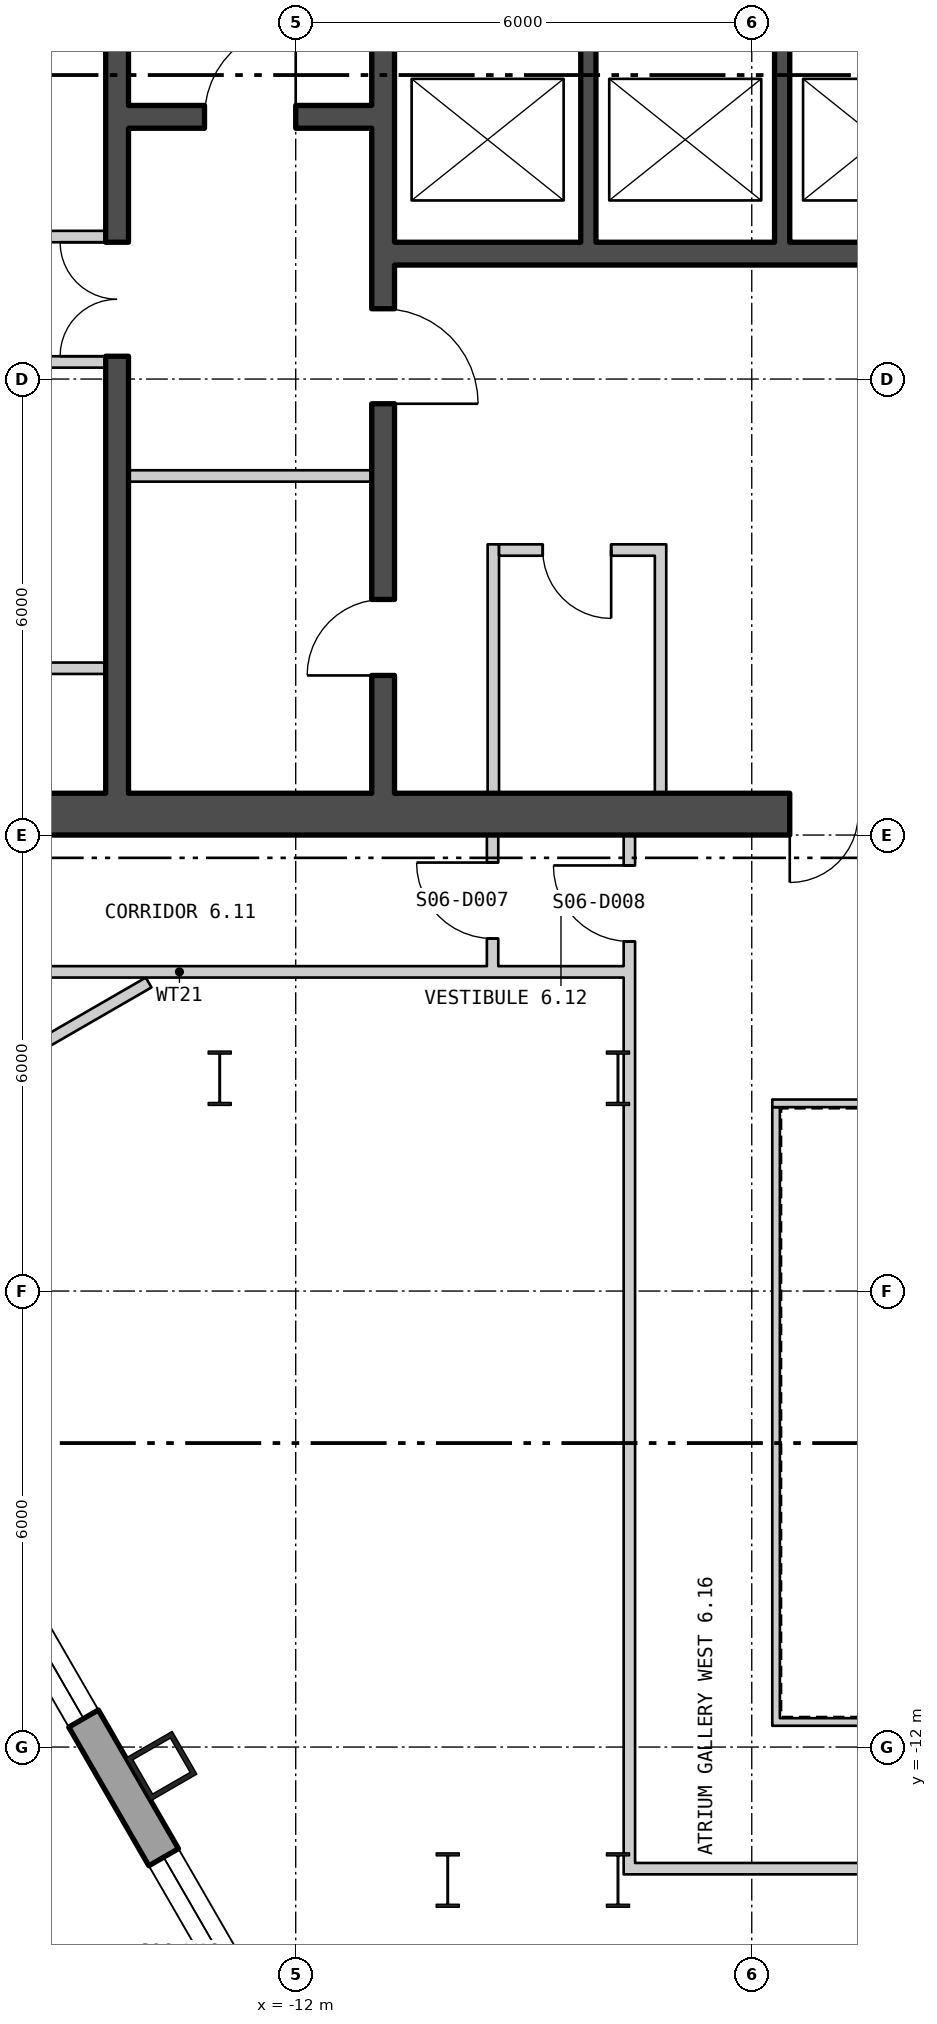
"""IFC4 building model, lengths in metres.
Left out: names, types, materials, properties, quantities, classifications, styles, units other than length and angle.
Written with IfcOpenShell. Run it as: python <this file> out.ifc"""

import sys

from ifc_helpers import new_model, si_unit, direction, frame, frame_2d, origin, origin_2d, place, context, subcontext, project, spatial, polyline, rectangle, hollow_rectangle, i_section, outline, extrude, element, fill, save


model = new_model("IFC4")
c1 = context("Model", 3, precision=1e-05, world=origin(), true_north=direction((0.0, 1.0)))
c2 = subcontext(c1, "Body", "Model", "MODEL_VIEW")
j1 = project(units=[si_unit("LENGTHUNIT", "METRE"), si_unit("PLANEANGLEUNIT", "RADIAN")], contexts=[c1])
p1 = place(None, origin())
s1 = spatial("IfcSite", under=j1, at=p1, CompositionType="ELEMENT")
p2 = place(p1, origin())
s2 = spatial("IfcBuilding", under=s1, at=p2, CompositionType="ELEMENT")
p3 = place(p2, frame((0.0, 0.0, 84.3)))
s3 = spatial("IfcBuildingStorey", under=s2, at=p3, CompositionType="ELEMENT", Elevation=84.3)
p4 = place(p3, frame((-13.766, -12.25, 0.0), z_axis=(0.0, 0.0, 1.0), x_axis=(0.5, -0.866025403784, 0.0)))
e1 = element("IfcColumn", 1, at=p4, inside=s3, PredefinedType="COLUMN", context=c2, shape_type="SweptSolid", body=[
    extrude(hollow_rectangle(XDim=0.65, YDim=0.7, WallThickness=0.065, at=origin_2d()), origin(), (0.0, 0.0, 1.0), 4.5),
])
for number, where, z_axis, x_axis in (
    (2, (-7.76, -3.2, 0.0), (0.0, 0.0, 1.0), (1.0, 0.0, 0.0)),
    (3, (-7.76, -13.75, 0.0), (0.0, 0.0, 1.0), (1.0, 0.0, 0.0)),
    (4, (-13.0, -3.2, 0.0), (0.0, 0.0, 1.0), (1.0, 0.0, 0.0)),
    (5, (-10.0, -13.75, 0.0), (0.0, 0.0, 1.0), (1.0, 0.0, 0.0)),
):
    element("IfcColumn", number, at=place(p3, frame(where, z_axis=z_axis, x_axis=x_axis)), inside=s3, PredefinedType="COLUMN", context=c2, shape_type="SweptSolid", body=[
        extrude(i_section(OverallWidth=0.304, OverallDepth=0.716, WebThickness=0.021, FlangeThickness=0.04, at=origin_2d()), origin(), (0.0, 0.0, 1.0), 4.5),
    ])
p5 = place(p3, frame((-27.95, 11.167, -0.18), z_axis=(0.0, 0.0, 1.0), x_axis=(0.499999194392, -0.866025868902, 0.0)))
e6 = element("IfcWall", 6, at=p5, inside=s3, PredefinedType="SOLIDWALL", context=c2, shape_type="SweptSolid", body=[
    extrude(outline(polyline([(-0.13, -0.225), (45.86, -0.225), (45.6, 0.225), (0.13, 0.225), (-0.13, -0.225)])), origin(), (0.0, 0.0, 1.0), 4.28),
])
p6 = place(p5, frame((5.892, 0.0, 1.08)))
e7 = element("IfcOpeningElement", 7, at=p6, cuts=e6, PredefinedType="OPENING", context=c2, shape_type="SweptSolid", body=[
    extrude(rectangle(XDim=2.4, YDim=2.6, at=frame_2d((1.2, 1.3))), frame((0.0, 0.235, 0.0), z_axis=(0.0, -1.0, 0.0), x_axis=(1.0, 0.0, 0.0)), (0.0, 0.0, 1.0), 0.47),
])
p7 = place(p5, frame((10.399, 0.0, 1.08)))
e8 = element("IfcOpeningElement", 8, at=p7, cuts=e6, PredefinedType="OPENING", context=c2, shape_type="SweptSolid", body=[
    extrude(rectangle(XDim=2.4, YDim=2.6, at=frame_2d((1.2, 1.3))), frame((0.0, 0.235, 0.0), z_axis=(0.0, -1.0, 0.0), x_axis=(1.0, 0.0, 0.0)), (0.0, 0.0, 1.0), 0.47),
])
p8 = place(p5, frame((14.905, 0.0, 1.08)))
e9 = element("IfcOpeningElement", 9, at=p8, cuts=e6, PredefinedType="OPENING", context=c2, shape_type="SweptSolid", body=[
    extrude(rectangle(XDim=2.4, YDim=2.6, at=frame_2d((1.2, 1.3))), frame((0.0, 0.235, 0.0), z_axis=(0.0, -1.0, 0.0), x_axis=(1.0, 0.0, 0.0)), (0.0, 0.0, 1.0), 0.47),
])
p9 = place(p5, frame((19.412, 0.0, 1.08)))
e10 = element("IfcOpeningElement", 10, at=p9, cuts=e6, PredefinedType="OPENING", context=c2, shape_type="SweptSolid", body=[
    extrude(rectangle(XDim=2.4, YDim=2.6, at=frame_2d((1.2, 1.3))), frame((0.0, 0.235, 0.0), z_axis=(0.0, -1.0, 0.0), x_axis=(1.0, 0.0, 0.0)), (0.0, 0.0, 1.0), 0.47),
])
p10 = place(p5, frame((23.918, 0.0, 1.08)))
e11 = element("IfcOpeningElement", 11, at=p10, cuts=e6, PredefinedType="OPENING", context=c2, shape_type="SweptSolid", body=[
    extrude(rectangle(XDim=2.4, YDim=2.6, at=frame_2d((1.2, 1.3))), frame((0.0, 0.235, 0.0), z_axis=(0.0, -1.0, 0.0), x_axis=(1.0, 0.0, 0.0)), (0.0, 0.0, 1.0), 0.47),
])
p11 = place(p5, frame((28.425, 0.0, 1.08)))
e12 = element("IfcOpeningElement", 12, at=p11, cuts=e6, PredefinedType="OPENING", context=c2, shape_type="SweptSolid", body=[
    extrude(rectangle(XDim=2.4, YDim=2.6, at=frame_2d((1.2, 1.3))), frame((0.0, 0.235, 0.0), z_axis=(0.0, -1.0, 0.0), x_axis=(1.0, 0.0, 0.0)), (0.0, 0.0, 1.0), 0.47),
])
p12 = place(p5, frame((32.932, 0.0, 1.08)))
e13 = element("IfcOpeningElement", 13, at=p12, cuts=e6, PredefinedType="OPENING", context=c2, shape_type="SweptSolid", body=[
    extrude(rectangle(XDim=2.4, YDim=2.6, at=frame_2d((1.2, 1.3))), frame((0.0, 0.235, 0.0), z_axis=(0.0, -1.0, 0.0), x_axis=(1.0, 0.0, 0.0)), (0.0, 0.0, 1.0), 0.47),
])
p13 = place(p5, frame((37.438, 0.0, 1.08)))
e14 = element("IfcOpeningElement", 14, at=p13, cuts=e6, PredefinedType="OPENING", context=c2, shape_type="SweptSolid", body=[
    extrude(rectangle(XDim=2.4, YDim=2.6, at=frame_2d((1.2, 1.3))), frame((0.0, 0.235, 0.0), z_axis=(0.0, -1.0, 0.0), x_axis=(1.0, 0.0, 0.0)), (0.0, 0.0, 1.0), 0.47),
])
p14 = place(p5, frame((41.907, 0.0, 1.08)))
e15 = element("IfcOpeningElement", 15, at=p14, cuts=e6, PredefinedType="OPENING", context=c2, shape_type="SweptSolid", body=[
    extrude(rectangle(XDim=2.4, YDim=2.6, at=frame_2d((1.2, 1.3))), frame((0.0, 0.235, 0.0), z_axis=(0.0, -1.0, 0.0), x_axis=(1.0, 0.0, 0.0)), (0.0, 0.0, 1.0), 0.47),
])
for number, where, z_axis, x_axis in (
    (16, (-5.73, -11.67, 0.0), (0.0, 0.0, 1.0), (1.0, 0.0, 0.0)),
    (17, (5.73, -3.53, 0.0), (0.0, 0.0, 1.0), (-1.0, 0.0, 0.0)),
):
    element("IfcWall", number, at=place(p3, frame(where, z_axis=z_axis, x_axis=x_axis)), inside=s3, PredefinedType="PARTITIONING", context=c2, shape_type="SweptSolid", body=[
        extrude(rectangle(XDim=11.46, YDim=0.1, at=frame_2d((5.73, 0.0))), origin(), (0.0, 0.0, 1.0), 4.3),
    ])
p15 = place(p3, frame((-5.68, -3.58, 0.0), z_axis=(0.0, 0.0, 1.0), x_axis=(0.0, -1.0, 0.0)))
e18 = element("IfcWall", 18, at=p15, inside=s3, PredefinedType="PARTITIONING", context=c2, shape_type="SweptSolid", body=[
    extrude(rectangle(XDim=8.04, YDim=0.1, at=frame_2d((4.02, 0.0))), origin(), (0.0, 0.0, 1.0), 4.3),
])
p16 = place(p3, frame((-17.5, 0.275, 0.0), z_axis=(0.0, 0.0, 1.0), x_axis=(1.0, 0.0, 0.0)))
e19 = element("IfcWall", 19, at=p16, inside=s3, PredefinedType="SHEAR", context=c2, shape_type="SweptSolid", body=[
    extrude(rectangle(XDim=35.0, YDim=0.55, at=frame_2d((17.5, 0.0))), origin(), (0.0, 0.0, 1.0), 4.3),
])
p17 = place(p16, frame((12.0, 0.0, 0.0)))
e20 = element("IfcOpeningElement", 20, at=p17, cuts=e19, PredefinedType="OPENING", context=c2, shape_type="SweptSolid", body=[
    extrude(rectangle(XDim=1.8, YDim=2.4, at=frame_2d((0.9, 1.2))), frame((0.0, 0.285, 0.0), z_axis=(0.0, -1.0, 0.0), x_axis=(1.0, 0.0, 0.0)), (0.0, 0.0, 1.0), 0.57),
])
p18 = place(p16, frame((22.0, 0.0, 0.0)))
e21 = element("IfcOpeningElement", 21, at=p18, cuts=e19, PredefinedType="OPENING", context=c2, shape_type="SweptSolid", body=[
    extrude(rectangle(XDim=1.8, YDim=2.4, at=frame_2d((0.9, 1.2))), frame((0.0, 0.285, 0.0), z_axis=(0.0, -1.0, 0.0), x_axis=(1.0, 0.0, 0.0)), (0.0, 0.0, 1.0), 0.57),
])
p19 = place(p3, frame((-10.85, 0.55, 0.0), z_axis=(0.0, 0.0, 1.0), x_axis=(0.0, 1.0, 0.0)))
e22 = element("IfcWall", 22, at=p19, inside=s3, PredefinedType="SHEAR", context=c2, shape_type="SweptSolid", body=[
    extrude(rectangle(XDim=16.9, YDim=0.3, at=frame_2d((8.45, 0.0))), origin(), (0.0, 0.0, 1.0), 4.3),
])
p20 = place(p19, frame((5.125, 0.0, 0.0)))
e23 = element("IfcOpeningElement", 23, at=p20, cuts=e22, PredefinedType="OPENING", context=c2, shape_type="SweptSolid", body=[
    extrude(rectangle(XDim=1.25, YDim=2.1, at=frame_2d((0.625, 1.05))), frame((0.0, 0.16, 0.0), z_axis=(0.0, -1.0, 0.0), x_axis=(1.0, 0.0, 0.0)), (0.0, 0.0, 1.0), 0.32),
])
p21 = place(p19, frame((1.55, 0.0, 0.0)))
e24 = element("IfcOpeningElement", 24, at=p21, cuts=e22, PredefinedType="OPENING", context=c2, shape_type="SweptSolid", body=[
    extrude(rectangle(XDim=1.0, YDim=2.1, at=frame_2d((0.5, 1.05))), frame((0.0, 0.16, 0.0), z_axis=(0.0, -1.0, 0.0), x_axis=(1.0, 0.0, 0.0)), (0.0, 0.0, 1.0), 0.32),
])
p22 = place(p3, frame((-14.35, 0.55, 0.0), z_axis=(0.0, 0.0, 1.0), x_axis=(0.0, 1.0, 0.0)))
e25 = element("IfcWall", 25, at=p22, inside=s3, PredefinedType="SHEAR", context=c2, shape_type="SweptSolid", body=[
    extrude(rectangle(XDim=16.9, YDim=0.3, at=frame_2d((8.45, 0.0))), origin(), (0.0, 0.0, 1.0), 4.3),
])
p23 = place(p22, frame((5.75, 0.0, 0.0)))
e26 = element("IfcOpeningElement", 26, at=p23, cuts=e25, PredefinedType="OPENING", context=c2, shape_type="SweptSolid", body=[
    extrude(rectangle(XDim=1.5, YDim=2.1, at=frame_2d((0.75, 1.05))), frame((0.0, 0.16, 0.0), z_axis=(0.0, -1.0, 0.0), x_axis=(1.0, 0.0, 0.0)), (0.0, 0.0, 1.0), 0.32),
])
p24 = place(p3, frame((-14.2, 9.45, 0.0), z_axis=(0.0, 0.0, 1.0), x_axis=(1.0, 0.0, 0.0)))
e27 = element("IfcWall", 27, at=p24, inside=s3, PredefinedType="SHEAR", context=c2, shape_type="SweptSolid", body=[
    extrude(rectangle(XDim=3.2, YDim=0.3, at=frame_2d((1.6, 0.0))), origin(), (0.0, 0.0, 1.0), 4.3),
])
p25 = place(p24, frame((1.0, 0.0, 0.0)))
e28 = element("IfcOpeningElement", 28, at=p25, cuts=e27, PredefinedType="OPENING", context=c2, shape_type="SweptSolid", body=[
    extrude(rectangle(XDim=1.2, YDim=2.1, at=frame_2d((0.6, 1.05))), frame((0.0, 0.16, 0.0), z_axis=(0.0, -1.0, 0.0), x_axis=(1.0, 0.0, 0.0)), (0.0, 0.0, 1.0), 0.32),
])
p26 = place(p3, frame((-10.7, 7.65, 0.0), z_axis=(0.0, 0.0, 1.0), x_axis=(1.0, 0.0, 0.0)))
e29 = element("IfcWall", 29, at=p26, inside=s3, PredefinedType="SHEAR", context=c2, shape_type="SweptSolid", body=[
    extrude(rectangle(XDim=10.3, YDim=0.3, at=frame_2d((5.15, 0.0))), origin(), (0.0, 0.0, 1.0), 4.3),
])
for number, where, z_axis, x_axis in (
    (30, (-8.15, 7.8, 0.0), (0.0, 0.0, 1.0), (0.0, 1.0, 0.0)),
    (31, (-5.6, 7.8, 0.0), (0.0, 0.0, 1.0), (0.0, 1.0, 0.0)),
):
    element("IfcWall", number, at=place(p3, frame(where, z_axis=z_axis, x_axis=x_axis)), inside=s3, PredefinedType="SHEAR", context=c2, shape_type="SweptSolid", body=[
        extrude(rectangle(XDim=2.7, YDim=0.2, at=frame_2d((1.35, 0.0))), origin(), (0.0, 0.0, 1.0), 4.3),
    ])
p27 = place(p3, frame((-14.2, 4.725, 0.0), z_axis=(0.0, 0.0, 1.0), x_axis=(1.0, 0.0, 0.0)))
e32 = element("IfcWall", 32, at=p27, inside=s3, PredefinedType="PARTITIONING", context=c2, shape_type="SweptSolid", body=[
    extrude(rectangle(XDim=3.2, YDim=0.15, at=frame_2d((1.6, 0.0))), origin(), (0.0, 0.0, 1.0), 4.3),
])
for number, where, z_axis, x_axis in (
    (33, (-16.95, 6.225, 0.0), (0.0, 0.0, 1.0), (1.0, 0.0, 0.0)),
    (34, (-16.95, 7.875, 0.0), (0.0, 0.0, 1.0), (1.0, 0.0, 0.0)),
    (35, (-16.95, 2.195, 0.0), (0.0, 0.0, 1.0), (1.0, 0.0, 0.0)),
):
    element("IfcWall", number, at=place(p3, frame(where, z_axis=z_axis, x_axis=x_axis)), inside=s3, PredefinedType="PARTITIONING", context=c2, shape_type="SweptSolid", body=[
        extrude(rectangle(XDim=2.45, YDim=0.15, at=frame_2d((1.225, 0.0))), origin(), (0.0, 0.0, 1.0), 4.3),
    ])
for number, where, z_axis, x_axis in (
    (36, (-9.4, 0.55, 0.0), (0.0, 0.0, 1.0), (0.0, 1.0, 0.0)),
    (37, (-7.2, 0.55, 0.0), (0.0, 0.0, 1.0), (0.0, 1.0, 0.0)),
):
    element("IfcWall", number, at=place(p3, frame(where, z_axis=z_axis, x_axis=x_axis)), inside=s3, PredefinedType="PARTITIONING", context=c2, shape_type="SweptSolid", body=[
        extrude(rectangle(XDim=3.275, YDim=0.15, at=frame_2d((1.637, 0.0))), origin(), (0.0, 0.0, 1.0), 4.3),
    ])
p28 = place(p3, frame((-9.325, 3.75, 0.0), z_axis=(0.0, 0.0, 1.0), x_axis=(1.0, 0.0, 0.0)))
e38 = element("IfcWall", 38, at=p28, inside=s3, PredefinedType="PARTITIONING", context=c2, shape_type="SweptSolid", body=[
    extrude(rectangle(XDim=2.05, YDim=0.15, at=frame_2d((1.025, 0.0))), origin(), (0.0, 0.0, 1.0), 4.3),
])
p29 = place(p28, frame((0.575, 0.0, 0.0)))
e39 = element("IfcOpeningElement", 39, at=p29, cuts=e38, PredefinedType="OPENING", context=c2, shape_type="SweptSolid", body=[
    extrude(rectangle(XDim=0.9, YDim=2.1, at=frame_2d((0.45, 1.05))), frame((0.0, 0.085, 0.0), z_axis=(0.0, -1.0, 0.0), x_axis=(1.0, 0.0, 0.0)), (0.0, 0.0, 1.0), 0.17),
])
p30 = place(p3, frame((-19.375, -1.8, 0.0), z_axis=(0.0, 0.0, 1.0), x_axis=(1.0, 0.0, 0.0)))
e40 = element("IfcWall", 40, at=p30, inside=s3, PredefinedType="PARTITIONING", context=c2, shape_type="SweptSolid", body=[
    extrude(rectangle(XDim=11.69, YDim=0.15, at=frame_2d((5.845, 0.0))), origin(), (0.0, 0.0, 1.0), 4.3),
])
p31 = place(p30, frame((2.365, 0.0, 0.0)))
e41 = element("IfcOpeningElement", 41, at=p31, cuts=e40, PredefinedType="OPENING", context=c2, shape_type="SweptSolid", body=[
    extrude(rectangle(XDim=1.0, YDim=2.1, at=frame_2d((0.5, 1.05))), frame((0.0, 0.085, 0.0), z_axis=(0.0, -1.0, 0.0), x_axis=(1.0, 0.0, 0.0)), (0.0, 0.0, 1.0), 0.17),
])
p32 = place(p3, frame((-18.186, -4.394, 0.0), z_axis=(0.0, 0.0, 1.0), x_axis=(0.866053278629, 0.499951716245, 0.0)))
e42 = element("IfcWall", 42, at=p32, inside=s3, PredefinedType="PARTITIONING", context=c2, shape_type="SweptSolid", body=[
    extrude(rectangle(XDim=4.909, YDim=0.15, at=frame_2d((2.454, 0.0))), origin(), (0.0, 0.0, 1.0), 4.3),
])
p33 = place(p3, frame((-9.41, -1.725, 0.0), z_axis=(0.0, 0.0, 1.0), x_axis=(0.0, 1.0, 0.0)))
e43 = element("IfcWall", 43, at=p33, inside=s3, PredefinedType="PARTITIONING", context=c2, shape_type="SweptSolid", body=[
    extrude(rectangle(XDim=1.725, YDim=0.15, at=frame_2d((0.863, 0.0))), origin(), (0.0, 0.0, 1.0), 4.3),
])
p34 = place(p33, frame((0.363, 0.0, 0.0)))
e44 = element("IfcOpeningElement", 44, at=p34, cuts=e43, PredefinedType="OPENING", context=c2, shape_type="SweptSolid", body=[
    extrude(rectangle(XDim=1.0, YDim=2.1, at=frame_2d((0.5, 1.05))), frame((0.0, 0.085, 0.0), z_axis=(0.0, -1.0, 0.0), x_axis=(1.0, 0.0, 0.0)), (0.0, 0.0, 1.0), 0.17),
])
p35 = place(p3, frame((-7.61, -13.675, 0.0), z_axis=(0.0, 0.0, 1.0), x_axis=(0.0, 1.0, 0.0)))
e45 = element("IfcWall", 45, at=p35, inside=s3, PredefinedType="PARTITIONING", context=c2, shape_type="SweptSolid", body=[
    extrude(rectangle(XDim=10.167, YDim=0.15, at=frame_2d((5.083, 0.0))), origin(), (0.0, 0.0, 1.0), 3.7),
])
p36 = place(p3, frame((-7.61, -3.508, 0.0), z_axis=(0.0, 0.0, 1.0), x_axis=(0.0, 1.0, 0.0)))
e46 = element("IfcWall", 46, at=p36, inside=s3, PredefinedType="PARTITIONING", context=c2, shape_type="SweptSolid", body=[
    extrude(rectangle(XDim=3.508, YDim=0.15, at=frame_2d((1.754, 0.0))), origin(), (0.0, 0.0, 1.0), 4.3),
])
p37 = place(p36, frame((2.108, 0.0, 0.0)))
e47 = element("IfcOpeningElement", 47, at=p37, cuts=e46, PredefinedType="OPENING", context=c2, shape_type="SweptSolid", body=[
    extrude(rectangle(XDim=1.0, YDim=2.1, at=frame_2d((0.5, 1.05))), frame((0.0, 0.085, 0.0), z_axis=(0.0, -1.0, 0.0), x_axis=(1.0, 0.0, 0.0)), (0.0, 0.0, 1.0), 0.17),
])
p38 = place(p3, frame((-7.535, -13.6, 0.0), z_axis=(0.0, 0.0, 1.0), x_axis=(1.0, 0.0, 0.0)))
e48 = element("IfcWall", 48, at=p38, inside=s3, PredefinedType="PARTITIONING", context=c2, shape_type="SweptSolid", body=[
    extrude(rectangle(XDim=5.835, YDim=0.15, at=frame_2d((2.917, 0.0))), origin(), (0.0, 0.0, 1.0), 3.39),
])
p39 = place(p38, frame((3.324, 0.0, 0.0)))
e49 = element("IfcOpeningElement", 49, at=p39, cuts=e48, PredefinedType="OPENING", context=c2, shape_type="SweptSolid", body=[
    extrude(rectangle(XDim=1.0, YDim=2.1, at=frame_2d((0.5, 1.05))), frame((0.0, 0.085, 0.0), z_axis=(0.0, -1.0, 0.0), x_axis=(1.0, 0.0, 0.0)), (0.0, 0.0, 1.0), 0.17),
])
p40 = place(p10, origin())
e50 = element("IfcWindow", 50, at=p40, inside=s3, PartitioningType="SINGLE_PANEL", PredefinedType="WINDOW", context=c2, shape_type="SweptSolid", body=[
    extrude(rectangle(XDim=2.4, YDim=2.6, at=frame_2d((1.2, 1.3))), frame((0.0, 0.105, 0.0), z_axis=(0.0, -1.0, 0.0), x_axis=(1.0, 0.0, 0.0)), (0.0, 0.0, 1.0), 0.06),
])
fill(e11, e50)
p41 = place(p11, origin())
e51 = element("IfcWindow", 51, at=p41, inside=s3, PartitioningType="SINGLE_PANEL", PredefinedType="WINDOW", context=c2, shape_type="SweptSolid", body=[
    extrude(rectangle(XDim=2.4, YDim=2.6, at=frame_2d((1.2, 1.3))), frame((0.0, 0.105, 0.0), z_axis=(0.0, -1.0, 0.0), x_axis=(1.0, 0.0, 0.0)), (0.0, 0.0, 1.0), 0.06),
])
fill(e12, e51)
p42 = place(p25, origin())
e52 = element("IfcDoor", 52, at=p42, inside=s3, OperationType="SINGLE_SWING_LEFT", PredefinedType="DOOR", context=c2, shape_type="SweptSolid", body=[
    extrude(rectangle(XDim=1.2, YDim=2.1, at=frame_2d((0.6, 1.05))), frame((0.0, 0.025, 0.0), z_axis=(0.0, -1.0, 0.0), x_axis=(1.0, 0.0, 0.0)), (0.0, 0.0, 1.0), 0.05),
])
fill(e28, e52)
p43 = place(p20, origin())
e53 = element("IfcDoor", 53, at=p43, inside=s3, OperationType="SINGLE_SWING_LEFT", PredefinedType="DOOR", context=c2, shape_type="SweptSolid", body=[
    extrude(rectangle(XDim=1.25, YDim=2.1, at=frame_2d((0.625, 1.05))), frame((0.0, 0.025, 0.0), z_axis=(0.0, -1.0, 0.0), x_axis=(1.0, 0.0, 0.0)), (0.0, 0.0, 1.0), 0.05),
])
fill(e23, e53)
p44 = place(p21, origin())
e54 = element("IfcDoor", 54, at=p44, inside=s3, OperationType="SINGLE_SWING_RIGHT", PredefinedType="DOOR", context=c2, shape_type="SweptSolid", body=[
    extrude(rectangle(XDim=1.0, YDim=2.1, at=frame_2d((0.5, 1.05))), frame((0.0, 0.025, 0.0), z_axis=(0.0, -1.0, 0.0), x_axis=(1.0, 0.0, 0.0)), (0.0, 0.0, 1.0), 0.05),
])
fill(e24, e54)
p45 = place(p23, origin())
e55 = element("IfcDoor", 55, at=p45, inside=s3, OperationType="DOUBLE_DOOR_SINGLE_SWING", PredefinedType="DOOR", context=c2, shape_type="SweptSolid", body=[
    extrude(rectangle(XDim=1.5, YDim=2.1, at=frame_2d((0.75, 1.05))), frame((0.0, 0.025, 0.0), z_axis=(0.0, -1.0, 0.0), x_axis=(1.0, 0.0, 0.0)), (0.0, 0.0, 1.0), 0.05),
])
fill(e26, e55)
p46 = place(p29, origin())
e56 = element("IfcDoor", 56, at=p46, inside=s3, OperationType="SINGLE_SWING_RIGHT", PredefinedType="DOOR", context=c2, shape_type="SweptSolid", body=[
    extrude(rectangle(XDim=0.9, YDim=2.1, at=frame_2d((0.45, 1.05))), frame((0.0, 0.025, 0.0), z_axis=(0.0, -1.0, 0.0), x_axis=(1.0, 0.0, 0.0)), (0.0, 0.0, 1.0), 0.05),
])
fill(e39, e56)
p47 = place(p17, origin())
e57 = element("IfcDoor", 57, at=p47, inside=s3, OperationType="DOUBLE_DOOR_SINGLE_SWING", PredefinedType="DOOR", context=c2, shape_type="SweptSolid", body=[
    extrude(rectangle(XDim=1.8, YDim=2.4, at=frame_2d((0.9, 1.2))), frame((0.0, 0.025, 0.0), z_axis=(0.0, -1.0, 0.0), x_axis=(1.0, 0.0, 0.0)), (0.0, 0.0, 1.0), 0.05),
])
fill(e20, e57)
p48 = place(p34, origin())
e58 = element("IfcDoor", 58, at=p48, inside=s3, OperationType="SINGLE_SWING_LEFT", PredefinedType="DOOR", context=c2, shape_type="SweptSolid", body=[
    extrude(rectangle(XDim=1.0, YDim=2.1, at=frame_2d((0.5, 1.05))), frame((0.0, 0.025, 0.0), z_axis=(0.0, -1.0, 0.0), x_axis=(1.0, 0.0, 0.0)), (0.0, 0.0, 1.0), 0.05),
])
fill(e44, e58)
p49 = place(p37, origin())
e59 = element("IfcDoor", 59, at=p49, inside=s3, OperationType="SINGLE_SWING_LEFT", PredefinedType="DOOR", context=c2, shape_type="SweptSolid", body=[
    extrude(rectangle(XDim=1.0, YDim=2.1, at=frame_2d((0.5, 1.05))), frame((0.0, 0.025, 0.0), z_axis=(0.0, -1.0, 0.0), x_axis=(1.0, 0.0, 0.0)), (0.0, 0.0, 1.0), 0.05),
])
fill(e47, e59)
save(model, sys.argv[1])
